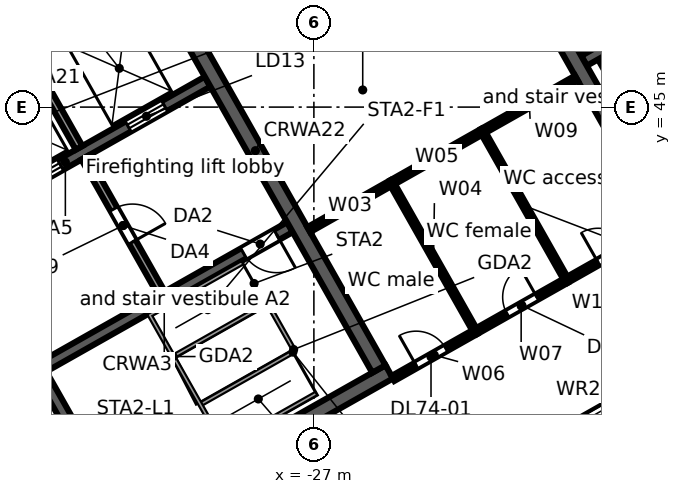
"""IFC4 building model, lengths in metres.
Left out: names, types, materials, properties, quantities, classifications, styles, units other than length and angle.
Written with IfcOpenShell. Run it as: python <this file> out.ifc"""

import sys

from ifc_helpers import new_model, si_unit, direction, frame, frame_2d, origin, place, context, subcontext, project, spatial, rectangle, extrude, element, fill, save


model = new_model("IFC4")
c1 = context("Model", 3, precision=1e-05, world=origin(), true_north=direction((0.0, 1.0)))
c2 = subcontext(c1, "Body", "Model", "MODEL_VIEW")
j1 = project(units=[si_unit("LENGTHUNIT", "METRE"), si_unit("PLANEANGLEUNIT", "RADIAN")], contexts=[c1])
p1 = place(None, origin())
s1 = spatial("IfcSite", under=j1, at=p1, CompositionType="ELEMENT")
p2 = place(p1, origin())
s2 = spatial("IfcBuilding", under=s1, at=p2, CompositionType="ELEMENT")
p3 = place(p2, frame((0.0, 0.0, 331.7)))
s3 = spatial("IfcBuildingStorey", under=s2, at=p3, CompositionType="ELEMENT", Elevation=331.7)
p4 = place(p3, frame((-3.017, 46.293, 0.0), z_axis=(0.0, 0.0, 1.0), x_axis=(-0.870355474887, -0.492423950812, 0.0)))
e1 = element("IfcWall", 1, at=p4, inside=s3, PredefinedType="STANDARD", context=c2, shape_type="SweptSolid", body=[
    extrude(rectangle(XDim=40.34, YDim=0.25, at=frame_2d((20.17, 0.0))), origin(), (0.0, 0.0, 1.0), 3.52),
])
p5 = place(p4, frame((37.428, 0.0, 0.8)))
e2 = element("IfcOpeningElement", 2, at=p5, cuts=e1, PredefinedType="OPENING", context=c2, shape_type="SweptSolid", body=[
    extrude(rectangle(XDim=2.4, YDim=2.2, at=frame_2d((1.2, 1.1))), frame((0.0, 0.135, 0.0), z_axis=(0.0, -1.0, 0.0), x_axis=(1.0, 0.0, 0.0)), (0.0, 0.0, 1.0), 0.27),
])
p6 = place(p4, frame((34.372, 0.0, 0.0)))
e3 = element("IfcOpeningElement", 3, at=p6, cuts=e1, PredefinedType="OPENING", context=c2, shape_type="SweptSolid", body=[
    extrude(rectangle(XDim=1.8, YDim=2.4, at=frame_2d((0.9, 1.2))), frame((0.0, 0.135, 0.0), z_axis=(0.0, -1.0, 0.0), x_axis=(1.0, 0.0, 0.0)), (0.0, 0.0, 1.0), 0.27),
])
p7 = place(p4, frame((30.716, 0.0, 0.8)))
e4 = element("IfcOpeningElement", 4, at=p7, cuts=e1, PredefinedType="OPENING", context=c2, shape_type="SweptSolid", body=[
    extrude(rectangle(XDim=2.4, YDim=2.2, at=frame_2d((1.2, 1.1))), frame((0.0, 0.135, 0.0), z_axis=(0.0, -1.0, 0.0), x_axis=(1.0, 0.0, 0.0)), (0.0, 0.0, 1.0), 0.27),
])
p8 = place(p4, frame((27.36, 0.0, 0.8)))
e5 = element("IfcOpeningElement", 5, at=p8, cuts=e1, PredefinedType="OPENING", context=c2, shape_type="SweptSolid", body=[
    extrude(rectangle(XDim=2.4, YDim=2.2, at=frame_2d((1.2, 1.1))), frame((0.0, 0.135, 0.0), z_axis=(0.0, -1.0, 0.0), x_axis=(1.0, 0.0, 0.0)), (0.0, 0.0, 1.0), 0.27),
])
p9 = place(p4, frame((24.304, 0.0, 0.0)))
e6 = element("IfcOpeningElement", 6, at=p9, cuts=e1, PredefinedType="OPENING", context=c2, shape_type="SweptSolid", body=[
    extrude(rectangle(XDim=1.8, YDim=2.4, at=frame_2d((0.9, 1.2))), frame((0.0, 0.135, 0.0), z_axis=(0.0, -1.0, 0.0), x_axis=(1.0, 0.0, 0.0)), (0.0, 0.0, 1.0), 0.27),
])
p10 = place(p4, frame((20.648, 0.0, 0.8)))
e7 = element("IfcOpeningElement", 7, at=p10, cuts=e1, PredefinedType="OPENING", context=c2, shape_type="SweptSolid", body=[
    extrude(rectangle(XDim=2.4, YDim=2.2, at=frame_2d((1.2, 1.1))), frame((0.0, 0.135, 0.0), z_axis=(0.0, -1.0, 0.0), x_axis=(1.0, 0.0, 0.0)), (0.0, 0.0, 1.0), 0.27),
])
p11 = place(p4, frame((17.292, 0.0, 0.8)))
e8 = element("IfcOpeningElement", 8, at=p11, cuts=e1, PredefinedType="OPENING", context=c2, shape_type="SweptSolid", body=[
    extrude(rectangle(XDim=2.4, YDim=2.2, at=frame_2d((1.2, 1.1))), frame((0.0, 0.135, 0.0), z_axis=(0.0, -1.0, 0.0), x_axis=(1.0, 0.0, 0.0)), (0.0, 0.0, 1.0), 0.27),
])
p12 = place(p4, frame((14.236, 0.0, 0.0)))
e9 = element("IfcOpeningElement", 9, at=p12, cuts=e1, PredefinedType="OPENING", context=c2, shape_type="SweptSolid", body=[
    extrude(rectangle(XDim=1.8, YDim=2.4, at=frame_2d((0.9, 1.2))), frame((0.0, 0.135, 0.0), z_axis=(0.0, -1.0, 0.0), x_axis=(1.0, 0.0, 0.0)), (0.0, 0.0, 1.0), 0.27),
])
p13 = place(p4, frame((10.58, 0.0, 0.8)))
e10 = element("IfcOpeningElement", 10, at=p13, cuts=e1, PredefinedType="OPENING", context=c2, shape_type="SweptSolid", body=[
    extrude(rectangle(XDim=2.4, YDim=2.2, at=frame_2d((1.2, 1.1))), frame((0.0, 0.135, 0.0), z_axis=(0.0, -1.0, 0.0), x_axis=(1.0, 0.0, 0.0)), (0.0, 0.0, 1.0), 0.27),
])
p14 = place(p4, frame((7.224, 0.0, 0.8)))
e11 = element("IfcOpeningElement", 11, at=p14, cuts=e1, PredefinedType="OPENING", context=c2, shape_type="SweptSolid", body=[
    extrude(rectangle(XDim=2.4, YDim=2.2, at=frame_2d((1.2, 1.1))), frame((0.0, 0.135, 0.0), z_axis=(0.0, -1.0, 0.0), x_axis=(1.0, 0.0, 0.0)), (0.0, 0.0, 1.0), 0.27),
])
p15 = place(p4, frame((4.168, 0.0, 0.0)))
e12 = element("IfcOpeningElement", 12, at=p15, cuts=e1, PredefinedType="OPENING", context=c2, shape_type="SweptSolid", body=[
    extrude(rectangle(XDim=1.8, YDim=2.4, at=frame_2d((0.9, 1.2))), frame((0.0, 0.135, 0.0), z_axis=(0.0, -1.0, 0.0), x_axis=(1.0, 0.0, 0.0)), (0.0, 0.0, 1.0), 0.27),
])
p16 = place(p4, frame((0.512, 0.0, 0.8)))
e13 = element("IfcOpeningElement", 13, at=p16, cuts=e1, PredefinedType="OPENING", context=c2, shape_type="SweptSolid", body=[
    extrude(rectangle(XDim=2.4, YDim=2.2, at=frame_2d((1.2, 1.1))), frame((0.0, 0.135, 0.0), z_axis=(0.0, -1.0, 0.0), x_axis=(1.0, 0.0, 0.0)), (0.0, 0.0, 1.0), 0.27),
])
p17 = place(p3, frame((-39.813, 29.662, 0.0), z_axis=(0.0, 0.0, 1.0), x_axis=(0.870350116061, 0.492433422375, 0.0)))
e14 = element("IfcWall", 14, at=p17, inside=s3, PredefinedType="SOLIDWALL", context=c2, shape_type="SweptSolid", body=[
    extrude(rectangle(XDim=17.0, YDim=0.4, at=frame_2d((8.5, 0.0))), origin(), (0.0, 0.0, 1.0), 3.52),
])
p18 = place(p17, frame((7.2, 0.0, 0.0)))
e15 = element("IfcOpeningElement", 15, at=p18, cuts=e14, PredefinedType="OPENING", context=c2, shape_type="SweptSolid", body=[
    extrude(rectangle(XDim=1.2, YDim=2.1, at=frame_2d((0.6, 1.05))), frame((0.0, 0.21, 0.0), z_axis=(0.0, -1.0, 0.0), x_axis=(1.0, 0.0, 0.0)), (0.0, 0.0, 1.0), 0.42),
])
p19 = place(p3, frame((-34.245, 38.097, 0.0), z_axis=(0.0, 0.0, 1.0), x_axis=(0.870356351998, 0.492422400523, 0.0)))
e16 = element("IfcWall", 16, at=p19, inside=s3, PredefinedType="SOLIDWALL", context=c2, shape_type="SweptSolid", body=[
    extrude(rectangle(XDim=7.6, YDim=0.3, at=frame_2d((3.8, 0.0))), origin(), (0.0, 0.0, 1.0), 3.52),
])
p20 = place(p19, frame((6.2, 0.0, 0.0)))
e17 = element("IfcOpeningElement", 17, at=p20, cuts=e16, PredefinedType="OPENING", context=c2, shape_type="SweptSolid", body=[
    extrude(rectangle(XDim=1.0, YDim=2.1, at=frame_2d((0.5, 1.05))), frame((0.0, 0.16, 0.0), z_axis=(0.0, -1.0, 0.0), x_axis=(1.0, 0.0, 0.0)), (0.0, 0.0, 1.0), 0.32),
])
p21 = place(p3, frame((-37.282, 41.435, 0.0), z_axis=(0.0, 0.0, 1.0), x_axis=(0.870361315115, 0.492413628113, 0.0)))
e18 = element("IfcWall", 18, at=p21, inside=s3, PredefinedType="SOLIDWALL", context=c2, shape_type="SweptSolid", body=[
    extrude(rectangle(XDim=8.6, YDim=0.3, at=frame_2d((4.3, 0.0))), origin(), (0.0, 0.0, 1.0), 3.52),
])
p22 = place(p21, frame((0.65, 0.0, 0.0)))
e19 = element("IfcOpeningElement", 19, at=p22, cuts=e18, PredefinedType="OPENING", context=c2, shape_type="SweptSolid", body=[
    extrude(rectangle(XDim=1.1, YDim=2.1, at=frame_2d((0.55, 1.05))), frame((0.0, 0.16, 0.0), z_axis=(0.0, -1.0, 0.0), x_axis=(1.0, 0.0, 0.0)), (0.0, 0.0, 1.0), 0.32),
])
p23 = place(p21, frame((3.05, 0.0, 0.0)))
e20 = element("IfcOpeningElement", 20, at=p23, cuts=e18, PredefinedType="OPENING", context=c2, shape_type="SweptSolid", body=[
    extrude(rectangle(XDim=1.1, YDim=2.1, at=frame_2d((0.55, 1.05))), frame((0.0, 0.16, 0.0), z_axis=(0.0, -1.0, 0.0), x_axis=(1.0, 0.0, 0.0)), (0.0, 0.0, 1.0), 0.32),
])
p24 = place(p21, frame((6.2, 0.0, 0.0)))
e21 = element("IfcOpeningElement", 21, at=p24, cuts=e18, PredefinedType="OPENING", context=c2, shape_type="SweptSolid", body=[
    extrude(rectangle(XDim=1.1, YDim=2.1, at=frame_2d((0.55, 1.05))), frame((0.0, 0.16, 0.0), z_axis=(0.0, -1.0, 0.0), x_axis=(1.0, 0.0, 0.0)), (0.0, 0.0, 1.0), 0.32),
])
p25 = place(p3, frame((-46.51, 41.499, 0.0), z_axis=(0.0, 0.0, 1.0), x_axis=(0.870356271124, 0.492422543467, 0.0)))
e22 = element("IfcWall", 22, at=p25, inside=s3, PredefinedType="SOLIDWALL", context=c2, shape_type="SweptSolid", body=[
    extrude(rectangle(XDim=17.0, YDim=0.4, at=frame_2d((8.5, 0.0))), origin(), (0.0, 0.0, 1.0), 3.52),
])
p26 = place(p3, frame((-34.171, 37.967, 0.0), z_axis=(0.0, 0.0, 1.0), x_axis=(0.492422543467, -0.870356271124, 0.0)))
e23 = element("IfcWall", 23, at=p26, inside=s3, PredefinedType="SOLIDWALL", context=c2, shape_type="SweptSolid", body=[
    extrude(rectangle(XDim=4.25, YDim=0.3, at=frame_2d((2.125, 0.0))), origin(), (0.0, 0.0, 1.0), 3.52),
])
p27 = place(p3, frame((-33.031, 43.667, 0.0), z_axis=(0.0, 0.0, 1.0), x_axis=(0.492408451753, -0.87036424366, 0.0)))
e24 = element("IfcWall", 24, at=p27, inside=s3, PredefinedType="PARTITIONING", context=c2, shape_type="SweptSolid", body=[
    extrude(rectangle(XDim=4.1, YDim=0.2, at=frame_2d((2.05, 0.0))), origin(), (0.0, 0.0, 1.0), 3.52),
])
p28 = place(p27, frame((1.55, 0.0, 0.0)))
e25 = element("IfcOpeningElement", 25, at=p28, cuts=e24, PredefinedType="OPENING", context=c2, shape_type="SweptSolid", body=[
    extrude(rectangle(XDim=1.0, YDim=2.1, at=frame_2d((0.5, 1.05))), frame((0.0, 0.11, 0.0), z_axis=(0.0, -1.0, 0.0), x_axis=(1.0, 0.0, 0.0)), (0.0, 0.0, 1.0), 0.22),
])
p29 = place(p3, frame((-35.271, 47.628, 0.0), z_axis=(0.0, 0.0, 1.0), x_axis=(0.492422543467, -0.870356271124, 0.0)))
e26 = element("IfcWall", 26, at=p29, inside=s3, PredefinedType="SOLIDWALL", context=c2, shape_type="SweptSolid", body=[
    extrude(rectangle(XDim=4.25, YDim=0.2, at=frame_2d((2.125, 0.0))), origin(), (0.0, 0.0, 1.0), 3.52),
])
p30 = place(p3, frame((-31.79, 49.597, 0.0), z_axis=(0.0, 0.0, 1.0), x_axis=(0.492421663121, -0.870356769198, 0.0)))
e27 = element("IfcWall", 27, at=p30, inside=s3, PredefinedType="SOLIDWALL", context=c2, shape_type="SweptSolid", body=[
    extrude(rectangle(XDim=13.2, YDim=0.4, at=frame_2d((6.6, 0.0))), origin(), (0.0, 0.0, 1.0), 3.52),
])
p31 = place(p3, frame((-19.892, 46.218, 0.0), z_axis=(0.0, 0.0, 1.0), x_axis=(0.870341639186, 0.492448404505, 0.0)))
e28 = element("IfcWall", 28, at=p31, inside=s3, PredefinedType="SOLIDWALL", context=c2, shape_type="SweptSolid", body=[
    extrude(rectangle(XDim=5.1, YDim=0.3, at=frame_2d((2.55, 0.0))), origin(), (0.0, 0.0, 1.0), 3.52),
])
p32 = place(p31, frame((0.75, 0.0, 0.0)))
e29 = element("IfcOpeningElement", 29, at=p32, cuts=e28, PredefinedType="OPENING", context=c2, shape_type="SweptSolid", body=[
    extrude(rectangle(XDim=1.1, YDim=2.1, at=frame_2d((0.55, 1.05))), frame((0.0, 0.16, 0.0), z_axis=(0.0, -1.0, 0.0), x_axis=(1.0, 0.0, 0.0)), (0.0, 0.0, 1.0), 0.32),
])
p33 = place(p31, frame((3.35, 0.0, 0.0)))
e30 = element("IfcOpeningElement", 30, at=p33, cuts=e28, PredefinedType="OPENING", context=c2, shape_type="SweptSolid", body=[
    extrude(rectangle(XDim=1.1, YDim=2.1, at=frame_2d((0.55, 1.05))), frame((0.0, 0.16, 0.0), z_axis=(0.0, -1.0, 0.0), x_axis=(1.0, 0.0, 0.0)), (0.0, 0.0, 1.0), 0.32),
])
p34 = place(p3, frame((-24.4, 53.779, 0.0), z_axis=(0.0, 0.0, 1.0), x_axis=(0.492421663121, -0.870356769198, 0.0)))
e31 = element("IfcWall", 31, at=p34, inside=s3, PredefinedType="SOLIDWALL", context=c2, shape_type="SweptSolid", body=[
    extrude(rectangle(XDim=13.2, YDim=0.4, at=frame_2d((6.6, 0.0))), origin(), (0.0, 0.0, 1.0), 3.52),
])
p35 = place(p3, frame((-27.134, 41.776, 0.0), z_axis=(0.0, 0.0, 1.0), x_axis=(0.870249744125, 0.492610782312, 0.0)))
e32 = element("IfcWall", 32, at=p35, inside=s3, PredefinedType="PARTITIONING", context=c2, shape_type="SweptSolid", body=[
    extrude(rectangle(XDim=2.499, YDim=0.15, at=frame_2d((1.25, 0.0))), origin(), (0.0, 0.0, 1.0), 2.792),
])
p36 = place(p3, frame((-24.959, 43.007, 0.0), z_axis=(0.0, 0.0, 1.0), x_axis=(0.492412939134, -0.87036170491, 0.0)))
e33 = element("IfcWall", 33, at=p36, inside=s3, PredefinedType="PARTITIONING", context=c2, shape_type="SweptSolid", body=[
    extrude(rectangle(XDim=4.5, YDim=0.125, at=frame_2d((2.25, 0.0))), origin(), (0.0, 0.0, 1.0), 3.52),
])
p37 = place(p3, frame((-24.959, 43.007, 0.0), z_axis=(0.0, 0.0, 1.0), x_axis=(0.870430549821, 0.492291232848, 0.0)))
e34 = element("IfcWall", 34, at=p37, inside=s3, PredefinedType="PARTITIONING", context=c2, shape_type="SweptSolid", body=[
    extrude(rectangle(XDim=2.75, YDim=0.15, at=frame_2d((1.375, 0.0))), origin(), (0.0, 0.0, 1.0), 3.52),
])
p38 = place(p3, frame((-24.919, 37.859, 0.0), z_axis=(0.0, 0.0, 1.0), x_axis=(0.870344512032, 0.49244332707, 0.0)))
e35 = element("IfcWall", 35, at=p38, inside=s3, PredefinedType="PARTITIONING", context=c2, shape_type="SweptSolid", body=[
    extrude(rectangle(XDim=2.5, YDim=0.15, at=frame_2d((1.25, 0.0))), origin(), (0.0, 0.0, 1.0), 2.792),
])
p39 = place(p38, frame((0.7, 0.0, 0.0)))
e36 = element("IfcOpeningElement", 36, at=p39, cuts=e35, PredefinedType="OPENING", context=c2, shape_type="SweptSolid", body=[
    extrude(rectangle(XDim=0.9, YDim=2.1, at=frame_2d((0.45, 1.05))), frame((0.0, 0.085, 0.0), z_axis=(0.0, -1.0, 0.0), x_axis=(1.0, 0.0, 0.0)), (0.0, 0.0, 1.0), 0.17),
])
p40 = place(p3, frame((-22.743, 39.09, 0.0), z_axis=(0.0, 0.0, 1.0), x_axis=(0.870409035047, 0.492329271634, 0.0)))
e37 = element("IfcWall", 37, at=p40, inside=s3, PredefinedType="PARTITIONING", context=c2, shape_type="SweptSolid", body=[
    extrude(rectangle(XDim=2.75, YDim=0.15, at=frame_2d((1.375, 0.0))), origin(), (0.0, 0.0, 1.0), 3.52),
])
p41 = place(p40, frame((0.95, 0.0, 0.0)))
e38 = element("IfcOpeningElement", 38, at=p41, cuts=e37, PredefinedType="OPENING", context=c2, shape_type="SweptSolid", body=[
    extrude(rectangle(XDim=0.9, YDim=2.1, at=frame_2d((0.45, 1.05))), frame((0.0, 0.085, 0.0), z_axis=(0.0, -1.0, 0.0), x_axis=(1.0, 0.0, 0.0)), (0.0, 0.0, 1.0), 0.17),
])
p42 = place(p3, frame((-22.565, 44.361, 0.0), z_axis=(0.0, 0.0, 1.0), x_axis=(0.492371842706, -0.870384954207, 0.0)))
e39 = element("IfcWall", 39, at=p42, inside=s3, PredefinedType="PARTITIONING", context=c2, shape_type="SweptSolid", body=[
    extrude(rectangle(XDim=4.5, YDim=0.125, at=frame_2d((2.25, 0.0))), origin(), (0.0, 0.0, 1.0), 3.52),
])
p43 = place(p3, frame((-22.565, 44.361, 0.0), z_axis=(0.0, 0.0, 1.0), x_axis=(0.87029856663, 0.492524522152, 0.0)))
e40 = element("IfcWall", 40, at=p43, inside=s3, PredefinedType="PARTITIONING", context=c2, shape_type="SweptSolid", body=[
    extrude(rectangle(XDim=2.84, YDim=0.15, at=frame_2d((1.42, 0.0))), origin(), (0.0, 0.0, 1.0), 3.52),
])
p44 = place(p3, frame((-20.349, 40.444, 0.0), z_axis=(0.0, 0.0, 1.0), x_axis=(0.87031941539, 0.492487680247, 0.0)))
e41 = element("IfcWall", 41, at=p44, inside=s3, PredefinedType="PARTITIONING", context=c2, shape_type="SweptSolid", body=[
    extrude(rectangle(XDim=2.841, YDim=0.15, at=frame_2d((1.42, 0.0))), origin(), (0.0, 0.0, 1.0), 3.52),
])
p45 = place(p44, frame((0.95, 0.0, 0.0)))
e42 = element("IfcOpeningElement", 42, at=p45, cuts=e41, PredefinedType="OPENING", context=c2, shape_type="SweptSolid", body=[
    extrude(rectangle(XDim=0.9, YDim=2.1, at=frame_2d((0.45, 1.05))), frame((0.0, 0.085, 0.0), z_axis=(0.0, -1.0, 0.0), x_axis=(1.0, 0.0, 0.0)), (0.0, 0.0, 1.0), 0.17),
])
p46 = place(p11, origin())
e43 = element("IfcWindow", 43, at=p46, inside=s3, PartitioningType="SINGLE_PANEL", PredefinedType="WINDOW", context=c2, shape_type="SweptSolid", body=[
    extrude(rectangle(XDim=2.4, YDim=2.2, at=frame_2d((1.2, 1.1))), frame((0.0, 0.03, 0.0), z_axis=(0.0, -1.0, 0.0), x_axis=(1.0, 0.0, 0.0)), (0.0, 0.0, 1.0), 0.06),
])
fill(e8, e43)
p47 = place(p23, origin())
e44 = element("IfcDoor", 44, at=p47, inside=s3, OperationType="DOUBLE_DOOR_SLIDING", PredefinedType="DOOR", context=c2, shape_type="SweptSolid", body=[
    extrude(rectangle(XDim=1.1, YDim=2.1, at=frame_2d((0.55, 1.05))), frame((0.0, 0.025, 0.0), z_axis=(0.0, -1.0, 0.0), x_axis=(1.0, 0.0, 0.0)), (0.0, 0.0, 1.0), 0.05),
])
fill(e20, e44)
p48 = place(p24, origin())
e45 = element("IfcDoor", 45, at=p48, inside=s3, OperationType="DOUBLE_DOOR_SLIDING", PredefinedType="DOOR", context=c2, shape_type="SweptSolid", body=[
    extrude(rectangle(XDim=1.1, YDim=2.1, at=frame_2d((0.55, 1.05))), frame((0.0, 0.025, 0.0), z_axis=(0.0, -1.0, 0.0), x_axis=(1.0, 0.0, 0.0)), (0.0, 0.0, 1.0), 0.05),
])
fill(e21, e45)
p49 = place(p20, frame((1.0, 0.0, 0.0), z_axis=(0.0, 0.0, 1.0), x_axis=(-1.0, 0.0, 0.0)))
e46 = element("IfcDoor", 46, at=p49, inside=s3, OperationType="SINGLE_SWING_LEFT", PredefinedType="DOOR", context=c2, shape_type="SweptSolid", body=[
    extrude(rectangle(XDim=1.0, YDim=2.1, at=frame_2d((0.5, 1.05))), frame((0.0, 0.025, 0.0), z_axis=(0.0, -1.0, 0.0), x_axis=(1.0, 0.0, 0.0)), (0.0, 0.0, 1.0), 0.05),
])
fill(e17, e46)
p50 = place(p28, origin())
e47 = element("IfcDoor", 47, at=p50, inside=s3, OperationType="SINGLE_SWING_RIGHT", PredefinedType="DOOR", context=c2, shape_type="SweptSolid", body=[
    extrude(rectangle(XDim=1.0, YDim=2.1, at=frame_2d((0.5, 1.05))), frame((0.0, 0.025, 0.0), z_axis=(0.0, -1.0, 0.0), x_axis=(1.0, 0.0, 0.0)), (0.0, 0.0, 1.0), 0.05),
])
fill(e25, e47)
p51 = place(p39, origin())
e48 = element("IfcDoor", 48, at=p51, inside=s3, OperationType="SINGLE_SWING_LEFT", PredefinedType="DOOR", context=c2, shape_type="SweptSolid", body=[
    extrude(rectangle(XDim=0.9, YDim=2.1, at=frame_2d((0.45, 1.05))), frame((0.0, 0.025, 0.0), z_axis=(0.0, -1.0, 0.0), x_axis=(1.0, 0.0, 0.0)), (0.0, 0.0, 1.0), 0.05),
])
fill(e36, e48)
p52 = place(p41, origin())
e49 = element("IfcDoor", 49, at=p52, inside=s3, OperationType="SINGLE_SWING_RIGHT", PredefinedType="DOOR", context=c2, shape_type="SweptSolid", body=[
    extrude(rectangle(XDim=0.9, YDim=2.1, at=frame_2d((0.45, 1.05))), frame((0.0, 0.025, 0.0), z_axis=(0.0, -1.0, 0.0), x_axis=(1.0, 0.0, 0.0)), (0.0, 0.0, 1.0), 0.05),
])
fill(e38, e49)
p53 = place(p45, origin())
e50 = element("IfcDoor", 50, at=p53, inside=s3, OperationType="SINGLE_SWING_LEFT", PredefinedType="DOOR", context=c2, shape_type="SweptSolid", body=[
    extrude(rectangle(XDim=0.9, YDim=2.1, at=frame_2d((0.45, 1.05))), frame((0.0, 0.025, 0.0), z_axis=(0.0, -1.0, 0.0), x_axis=(1.0, 0.0, 0.0)), (0.0, 0.0, 1.0), 0.05),
])
fill(e42, e50)
save(model, sys.argv[1])
